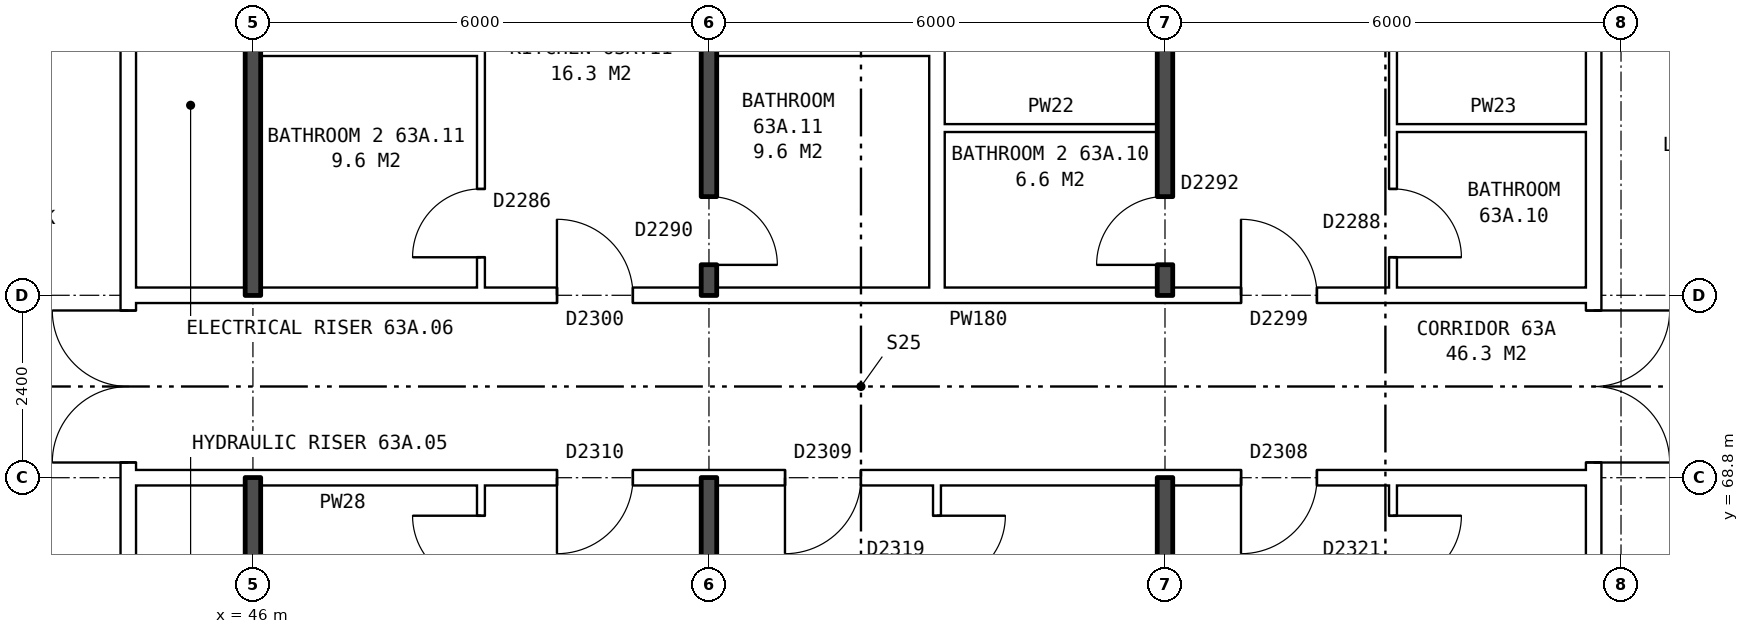
"""IFC4 building model, lengths in metres.
Left out: names, types, materials, properties, quantities, classifications, styles, units other than length and angle.
Written with IfcOpenShell. Run it as: python <this file> out.ifc"""

import sys

from ifc_helpers import new_model, si_unit, direction, frame, frame_2d, origin, place, context, subcontext, project, spatial, rectangle, extrude, element, fill, save


model = new_model("IFC4")
c1 = context("Model", 3, precision=1e-05, world=origin(), true_north=direction((0.0, 1.0)))
c2 = subcontext(c1, "Body", "Model", "MODEL_VIEW")
j1 = project(units=[si_unit("LENGTHUNIT", "METRE"), si_unit("PLANEANGLEUNIT", "RADIAN")], contexts=[c1])
p1 = place(None, origin())
s1 = spatial("IfcSite", under=j1, at=p1, CompositionType="ELEMENT")
p2 = place(p1, origin())
s2 = spatial("IfcBuilding", under=s1, at=p2, CompositionType="ELEMENT")
p3 = place(p2, frame((0.0, 0.0, 224.5)))
s3 = spatial("IfcBuildingStorey", under=s2, at=p3, CompositionType="ELEMENT", Elevation=224.5)
p4 = place(p3, frame((63.64, 63.9, 0.0), z_axis=(0.0, 0.0, 1.0), x_axis=(0.0, 1.0, 0.0)))
e1 = element("IfcWall", 1, at=p4, inside=s3, PredefinedType="PARTITIONING", context=c2, shape_type="SweptSolid", body=[
    extrude(rectangle(XDim=12.2, YDim=0.2, at=frame_2d((6.1, 0.0))), origin(), (0.0, 0.0, 1.0), 2.85),
])
p5 = place(p4, frame((5.1, 0.0, 0.0)))
e2 = element("IfcOpeningElement", 2, at=p5, cuts=e1, PredefinedType="OPENING", context=c2, shape_type="SweptSolid", body=[
    extrude(rectangle(XDim=2.0, YDim=2.1, at=frame_2d((1.0, 1.05))), frame((0.0, 0.11, 0.0), z_axis=(0.0, -1.0, 0.0), x_axis=(1.0, 0.0, 0.0)), (0.0, 0.0, 1.0), 0.22),
])
p6 = place(p3, frame((44.36, 63.9, 0.0), z_axis=(0.0, 0.0, 1.0), x_axis=(0.0, 1.0, 0.0)))
e3 = element("IfcWall", 3, at=p6, inside=s3, PredefinedType="PARTITIONING", context=c2, shape_type="SweptSolid", body=[
    extrude(rectangle(XDim=12.2, YDim=0.2, at=frame_2d((6.1, 0.0))), origin(), (0.0, 0.0, 1.0), 2.85),
])
p7 = place(p6, frame((5.1, 0.0, 0.0)))
e4 = element("IfcOpeningElement", 4, at=p7, cuts=e3, PredefinedType="OPENING", context=c2, shape_type="SweptSolid", body=[
    extrude(rectangle(XDim=2.0, YDim=2.1, at=frame_2d((1.0, 1.05))), frame((0.0, 0.11, 0.0), z_axis=(0.0, -1.0, 0.0), x_axis=(1.0, 0.0, 0.0)), (0.0, 0.0, 1.0), 0.22),
])
p8 = place(p3, frame((44.36, 68.8, 0.0), z_axis=(0.0, 0.0, 1.0), x_axis=(1.0, 0.0, 0.0)))
e5 = element("IfcWall", 5, at=p8, inside=s3, PredefinedType="PARTITIONING", context=c2, shape_type="SweptSolid", body=[
    extrude(rectangle(XDim=19.28, YDim=0.2, at=frame_2d((9.64, 0.0))), origin(), (0.0, 0.0, 1.0), 2.85),
])
p9 = place(p8, frame((14.64, 0.0, 0.0)))
e6 = element("IfcOpeningElement", 6, at=p9, cuts=e5, PredefinedType="OPENING", context=c2, shape_type="SweptSolid", body=[
    extrude(rectangle(XDim=1.0, YDim=2.1, at=frame_2d((0.5, 1.05))), frame((0.0, 0.11, 0.0), z_axis=(0.0, -1.0, 0.0), x_axis=(1.0, 0.0, 0.0)), (0.0, 0.0, 1.0), 0.22),
])
p10 = place(p8, frame((8.64, 0.0, 0.0)))
e7 = element("IfcOpeningElement", 7, at=p10, cuts=e5, PredefinedType="OPENING", context=c2, shape_type="SweptSolid", body=[
    extrude(rectangle(XDim=1.0, YDim=2.1, at=frame_2d((0.5, 1.05))), frame((0.0, 0.11, 0.0), z_axis=(0.0, -1.0, 0.0), x_axis=(1.0, 0.0, 0.0)), (0.0, 0.0, 1.0), 0.22),
])
p11 = place(p8, frame((5.64, 0.0, 0.0)))
e8 = element("IfcOpeningElement", 8, at=p11, cuts=e5, PredefinedType="OPENING", context=c2, shape_type="SweptSolid", body=[
    extrude(rectangle(XDim=1.0, YDim=2.1, at=frame_2d((0.5, 1.05))), frame((0.0, 0.11, 0.0), z_axis=(0.0, -1.0, 0.0), x_axis=(1.0, 0.0, 0.0)), (0.0, 0.0, 1.0), 0.22),
])
p12 = place(p3, frame((44.36, 71.2, 0.0), z_axis=(0.0, 0.0, 1.0), x_axis=(1.0, 0.0, 0.0)))
e9 = element("IfcWall", 9, at=p12, inside=s3, PredefinedType="PARTITIONING", context=c2, shape_type="SweptSolid", body=[
    extrude(rectangle(XDim=19.28, YDim=0.2, at=frame_2d((9.64, 0.0))), origin(), (0.0, 0.0, 1.0), 2.85),
])
p13 = place(p12, frame((14.64, 0.0, 0.0)))
e10 = element("IfcOpeningElement", 10, at=p13, cuts=e9, PredefinedType="OPENING", context=c2, shape_type="SweptSolid", body=[
    extrude(rectangle(XDim=1.0, YDim=2.1, at=frame_2d((0.5, 1.05))), frame((0.0, 0.11, 0.0), z_axis=(0.0, -1.0, 0.0), x_axis=(1.0, 0.0, 0.0)), (0.0, 0.0, 1.0), 0.22),
])
p14 = place(p12, frame((5.64, 0.0, 0.0)))
e11 = element("IfcOpeningElement", 11, at=p14, cuts=e9, PredefinedType="OPENING", context=c2, shape_type="SweptSolid", body=[
    extrude(rectangle(XDim=1.0, YDim=2.1, at=frame_2d((0.5, 1.05))), frame((0.0, 0.11, 0.0), z_axis=(0.0, -1.0, 0.0), x_axis=(1.0, 0.0, 0.0)), (0.0, 0.0, 1.0), 0.22),
])
p15 = place(p3, frame((55.1, 73.4, 0.0), z_axis=(0.0, 0.0, 1.0), x_axis=(1.0, 0.0, 0.0)))
e12 = element("IfcWall", 12, at=p15, inside=s3, PredefinedType="PARTITIONING", context=c2, shape_type="SweptSolid", body=[
    extrude(rectangle(XDim=2.8, YDim=0.1, at=frame_2d((1.4, 0.0))), origin(), (0.0, 0.0, 1.0), 2.85),
])
p16 = place(p3, frame((61.0, 73.4, 0.0), z_axis=(0.0, 0.0, 1.0), x_axis=(1.0, 0.0, 0.0)))
e13 = element("IfcWall", 13, at=p16, inside=s3, PredefinedType="PARTITIONING", context=c2, shape_type="SweptSolid", body=[
    extrude(rectangle(XDim=2.64, YDim=0.1, at=frame_2d((1.32, 0.0))), origin(), (0.0, 0.0, 1.0), 2.85),
])
p17 = place(p3, frame((46.1, 74.4, 0.0), z_axis=(0.0, 0.0, 1.0), x_axis=(1.0, 0.0, 0.0)))
e14 = element("IfcWall", 14, at=p17, inside=s3, PredefinedType="PARTITIONING", context=c2, shape_type="SweptSolid", body=[
    extrude(rectangle(XDim=2.9, YDim=0.1, at=frame_2d((1.45, 0.0))), origin(), (0.0, 0.0, 1.0), 2.85),
])
p18 = place(p3, frame((52.1, 74.4, 0.0), z_axis=(0.0, 0.0, 1.0), x_axis=(1.0, 0.0, 0.0)))
e15 = element("IfcWall", 15, at=p18, inside=s3, PredefinedType="PARTITIONING", context=c2, shape_type="SweptSolid", body=[
    extrude(rectangle(XDim=2.8, YDim=0.1, at=frame_2d((1.4, 0.0))), origin(), (0.0, 0.0, 1.0), 2.85),
])
for number, where, z_axis, x_axis in (
    (16, (46.0, 54.36, 0.0), (0.0, 0.0, 1.0), (0.0, 1.0, 0.0)),
    (17, (46.0, 71.2, 0.0), (0.0, 0.0, 1.0), (0.0, 1.0, 0.0)),
):
    element("IfcWall", number, at=place(p3, frame(where, z_axis=z_axis, x_axis=x_axis)), inside=s3, PredefinedType="SOLIDWALL", context=c2, shape_type="SweptSolid", body=[
        extrude(rectangle(XDim=14.44, YDim=0.2, at=frame_2d((7.22, 0.0))), origin(), (0.0, 0.0, 1.0), 2.85),
    ])
p19 = place(p3, frame((49.0, 54.36, 0.0), z_axis=(0.0, 0.0, 1.0), x_axis=(0.0, 1.0, 0.0)))
e18 = element("IfcWall", 18, at=p19, inside=s3, PredefinedType="PARTITIONING", context=c2, shape_type="SweptSolid", body=[
    extrude(rectangle(XDim=14.34, YDim=0.1, at=frame_2d((7.17, 0.0))), origin(), (0.0, 0.0, 1.0), 2.85),
])
p20 = place(p19, frame((7.7, 0.0, 0.0)))
e19 = element("IfcOpeningElement", 19, at=p20, cuts=e18, PredefinedType="OPENING", context=c2, shape_type="SweptSolid", body=[
    extrude(rectangle(XDim=0.9, YDim=2.1, at=frame_2d((0.45, 1.05))), frame((0.0, 0.06, 0.0), z_axis=(0.0, -1.0, 0.0), x_axis=(1.0, 0.0, 0.0)), (0.0, 0.0, 1.0), 0.12),
])
p21 = place(p19, frame((13.04, 0.0, 0.0)))
e20 = element("IfcOpeningElement", 20, at=p21, cuts=e18, PredefinedType="OPENING", context=c2, shape_type="SweptSolid", body=[
    extrude(rectangle(XDim=0.9, YDim=2.1, at=frame_2d((0.45, 1.05))), frame((0.0, 0.06, 0.0), z_axis=(0.0, -1.0, 0.0), x_axis=(1.0, 0.0, 0.0)), (0.0, 0.0, 1.0), 0.12),
])
p22 = place(p3, frame((49.0, 71.3, 0.0), z_axis=(0.0, 0.0, 1.0), x_axis=(0.0, 1.0, 0.0)))
e21 = element("IfcWall", 21, at=p22, inside=s3, PredefinedType="PARTITIONING", context=c2, shape_type="SweptSolid", body=[
    extrude(rectangle(XDim=14.34, YDim=0.1, at=frame_2d((7.17, 0.0))), origin(), (0.0, 0.0, 1.0), 2.85),
])
p23 = place(p22, frame((5.74, 0.0, 0.0)))
e22 = element("IfcOpeningElement", 22, at=p23, cuts=e21, PredefinedType="OPENING", context=c2, shape_type="SweptSolid", body=[
    extrude(rectangle(XDim=0.9, YDim=2.1, at=frame_2d((0.45, 1.05))), frame((0.0, 0.06, 0.0), z_axis=(0.0, -1.0, 0.0), x_axis=(1.0, 0.0, 0.0)), (0.0, 0.0, 1.0), 0.12),
])
p24 = place(p22, frame((0.4, 0.0, 0.0)))
e23 = element("IfcOpeningElement", 23, at=p24, cuts=e21, PredefinedType="OPENING", context=c2, shape_type="SweptSolid", body=[
    extrude(rectangle(XDim=0.9, YDim=2.1, at=frame_2d((0.45, 1.05))), frame((0.0, 0.06, 0.0), z_axis=(0.0, -1.0, 0.0), x_axis=(1.0, 0.0, 0.0)), (0.0, 0.0, 1.0), 0.12),
])
p25 = place(p3, frame((52.0, 54.36, 0.0), z_axis=(0.0, 0.0, 1.0), x_axis=(0.0, 1.0, 0.0)))
e24 = element("IfcWall", 24, at=p25, inside=s3, PredefinedType="SOLIDWALL", context=c2, shape_type="SweptSolid", body=[
    extrude(rectangle(XDim=14.44, YDim=0.2, at=frame_2d((7.22, 0.0))), origin(), (0.0, 0.0, 1.0), 2.85),
])
p26 = place(p3, frame((52.0, 71.2, 0.0), z_axis=(0.0, 0.0, 1.0), x_axis=(0.0, 1.0, 0.0)))
e25 = element("IfcWall", 25, at=p26, inside=s3, PredefinedType="SOLIDWALL", context=c2, shape_type="SweptSolid", body=[
    extrude(rectangle(XDim=14.44, YDim=0.2, at=frame_2d((7.22, 0.0))), origin(), (0.0, 0.0, 1.0), 2.85),
])
p27 = place(p26, frame((5.84, 0.0, 0.0)))
e26 = element("IfcOpeningElement", 26, at=p27, cuts=e25, PredefinedType="OPENING", context=c2, shape_type="SweptSolid", body=[
    extrude(rectangle(XDim=0.9, YDim=2.1, at=frame_2d((0.45, 1.05))), frame((0.0, 0.11, 0.0), z_axis=(0.0, -1.0, 0.0), x_axis=(1.0, 0.0, 0.0)), (0.0, 0.0, 1.0), 0.22),
])
p28 = place(p26, frame((0.4, 0.0, 0.0)))
e27 = element("IfcOpeningElement", 27, at=p28, cuts=e25, PredefinedType="OPENING", context=c2, shape_type="SweptSolid", body=[
    extrude(rectangle(XDim=0.9, YDim=2.1, at=frame_2d((0.45, 1.05))), frame((0.0, 0.11, 0.0), z_axis=(0.0, -1.0, 0.0), x_axis=(1.0, 0.0, 0.0)), (0.0, 0.0, 1.0), 0.22),
])
p29 = place(p3, frame((55.0, 54.36, 0.0), z_axis=(0.0, 0.0, 1.0), x_axis=(0.0, 1.0, 0.0)))
e28 = element("IfcWall", 28, at=p29, inside=s3, PredefinedType="PARTITIONING", context=c2, shape_type="SweptSolid", body=[
    extrude(rectangle(XDim=14.34, YDim=0.1, at=frame_2d((7.17, 0.0))), origin(), (0.0, 0.0, 1.0), 2.85),
])
p30 = place(p29, frame((4.2, 0.0, 0.0)))
e29 = element("IfcOpeningElement", 29, at=p30, cuts=e28, PredefinedType="OPENING", context=c2, shape_type="SweptSolid", body=[
    extrude(rectangle(XDim=0.9, YDim=2.1, at=frame_2d((0.45, 1.05))), frame((0.0, 0.06, 0.0), z_axis=(0.0, -1.0, 0.0), x_axis=(1.0, 0.0, 0.0)), (0.0, 0.0, 1.0), 0.12),
])
p31 = place(p29, frame((13.04, 0.0, 0.0)))
e30 = element("IfcOpeningElement", 30, at=p31, cuts=e28, PredefinedType="OPENING", context=c2, shape_type="SweptSolid", body=[
    extrude(rectangle(XDim=0.9, YDim=2.1, at=frame_2d((0.45, 1.05))), frame((0.0, 0.06, 0.0), z_axis=(0.0, -1.0, 0.0), x_axis=(1.0, 0.0, 0.0)), (0.0, 0.0, 1.0), 0.12),
])
p32 = place(p3, frame((55.0, 71.3, 0.0), z_axis=(0.0, 0.0, 1.0), x_axis=(0.0, 1.0, 0.0)))
e31 = element("IfcWall", 31, at=p32, inside=s3, PredefinedType="PARTITIONING", context=c2, shape_type="SweptSolid", body=[
    extrude(rectangle(XDim=14.34, YDim=0.2, at=frame_2d((7.17, 0.0))), origin(), (0.0, 0.0, 1.0), 2.85),
])
p33 = place(p3, frame((58.0, 54.36, 0.0), z_axis=(0.0, 0.0, 1.0), x_axis=(0.0, 1.0, 0.0)))
e32 = element("IfcWall", 32, at=p33, inside=s3, PredefinedType="SOLIDWALL", context=c2, shape_type="SweptSolid", body=[
    extrude(rectangle(XDim=14.44, YDim=0.2, at=frame_2d((7.22, 0.0))), origin(), (0.0, 0.0, 1.0), 2.85),
])
p34 = place(p3, frame((58.0, 71.2, 0.0), z_axis=(0.0, 0.0, 1.0), x_axis=(0.0, 1.0, 0.0)))
e33 = element("IfcWall", 33, at=p34, inside=s3, PredefinedType="SOLIDWALL", context=c2, shape_type="SweptSolid", body=[
    extrude(rectangle(XDim=14.44, YDim=0.2, at=frame_2d((7.22, 0.0))), origin(), (0.0, 0.0, 1.0), 2.85),
])
p35 = place(p34, frame((8.04, 0.0, 0.0)))
e34 = element("IfcOpeningElement", 34, at=p35, cuts=e33, PredefinedType="OPENING", context=c2, shape_type="SweptSolid", body=[
    extrude(rectangle(XDim=0.9, YDim=2.1, at=frame_2d((0.45, 1.05))), frame((0.0, 0.11, 0.0), z_axis=(0.0, -1.0, 0.0), x_axis=(1.0, 0.0, 0.0)), (0.0, 0.0, 1.0), 0.22),
])
p36 = place(p34, frame((0.4, 0.0, 0.0)))
e35 = element("IfcOpeningElement", 35, at=p36, cuts=e33, PredefinedType="OPENING", context=c2, shape_type="SweptSolid", body=[
    extrude(rectangle(XDim=0.9, YDim=2.1, at=frame_2d((0.45, 1.05))), frame((0.0, 0.11, 0.0), z_axis=(0.0, -1.0, 0.0), x_axis=(1.0, 0.0, 0.0)), (0.0, 0.0, 1.0), 0.22),
])
p37 = place(p3, frame((61.0, 54.36, 0.0), z_axis=(0.0, 0.0, 1.0), x_axis=(0.0, 1.0, 0.0)))
e36 = element("IfcWall", 36, at=p37, inside=s3, PredefinedType="PARTITIONING", context=c2, shape_type="SweptSolid", body=[
    extrude(rectangle(XDim=14.34, YDim=0.1, at=frame_2d((7.17, 0.0))), origin(), (0.0, 0.0, 1.0), 2.85),
])
p38 = place(p37, frame((7.7, 0.0, 0.0)))
e37 = element("IfcOpeningElement", 37, at=p38, cuts=e36, PredefinedType="OPENING", context=c2, shape_type="SweptSolid", body=[
    extrude(rectangle(XDim=0.9, YDim=2.1, at=frame_2d((0.45, 1.05))), frame((0.0, 0.06, 0.0), z_axis=(0.0, -1.0, 0.0), x_axis=(1.0, 0.0, 0.0)), (0.0, 0.0, 1.0), 0.12),
])
p39 = place(p37, frame((13.04, 0.0, 0.0)))
e38 = element("IfcOpeningElement", 38, at=p39, cuts=e36, PredefinedType="OPENING", context=c2, shape_type="SweptSolid", body=[
    extrude(rectangle(XDim=0.9, YDim=2.1, at=frame_2d((0.45, 1.05))), frame((0.0, 0.06, 0.0), z_axis=(0.0, -1.0, 0.0), x_axis=(1.0, 0.0, 0.0)), (0.0, 0.0, 1.0), 0.12),
])
p40 = place(p3, frame((61.0, 71.3, 0.0), z_axis=(0.0, 0.0, 1.0), x_axis=(0.0, 1.0, 0.0)))
e39 = element("IfcWall", 39, at=p40, inside=s3, PredefinedType="PARTITIONING", context=c2, shape_type="SweptSolid", body=[
    extrude(rectangle(XDim=14.34, YDim=0.1, at=frame_2d((7.17, 0.0))), origin(), (0.0, 0.0, 1.0), 2.85),
])
p41 = place(p40, frame((7.94, 0.0, 0.0)))
e40 = element("IfcOpeningElement", 40, at=p41, cuts=e39, PredefinedType="OPENING", context=c2, shape_type="SweptSolid", body=[
    extrude(rectangle(XDim=0.9, YDim=2.1, at=frame_2d((0.45, 1.05))), frame((0.0, 0.06, 0.0), z_axis=(0.0, -1.0, 0.0), x_axis=(1.0, 0.0, 0.0)), (0.0, 0.0, 1.0), 0.12),
])
p42 = place(p40, frame((0.4, 0.0, 0.0)))
e41 = element("IfcOpeningElement", 41, at=p42, cuts=e39, PredefinedType="OPENING", context=c2, shape_type="SweptSolid", body=[
    extrude(rectangle(XDim=0.9, YDim=2.1, at=frame_2d((0.45, 1.05))), frame((0.0, 0.06, 0.0), z_axis=(0.0, -1.0, 0.0), x_axis=(1.0, 0.0, 0.0)), (0.0, 0.0, 1.0), 0.12),
])
p43 = place(p5, frame((2.0, 0.0, 0.0), z_axis=(0.0, 0.0, 1.0), x_axis=(-1.0, 0.0, 0.0)))
e42 = element("IfcDoor", 42, at=p43, inside=s3, OperationType="DOUBLE_DOOR_SINGLE_SWING", PredefinedType="DOOR", context=c2, shape_type="SweptSolid", body=[
    extrude(rectangle(XDim=2.0, YDim=2.1, at=frame_2d((1.0, 1.05))), frame((0.0, 0.025, 0.0), z_axis=(0.0, -1.0, 0.0), x_axis=(1.0, 0.0, 0.0)), (0.0, 0.0, 1.0), 0.05),
])
fill(e2, e42)
p44 = place(p7, origin())
e43 = element("IfcDoor", 43, at=p44, inside=s3, OperationType="DOUBLE_DOOR_SINGLE_SWING", PredefinedType="DOOR", context=c2, shape_type="SweptSolid", body=[
    extrude(rectangle(XDim=2.0, YDim=2.1, at=frame_2d((1.0, 1.05))), frame((0.0, 0.025, 0.0), z_axis=(0.0, -1.0, 0.0), x_axis=(1.0, 0.0, 0.0)), (0.0, 0.0, 1.0), 0.05),
])
fill(e4, e43)
p45 = place(p9, frame((1.0, 0.0, 0.0), z_axis=(0.0, 0.0, 1.0), x_axis=(-1.0, 0.0, 0.0)))
e44 = element("IfcDoor", 44, at=p45, inside=s3, OperationType="SINGLE_SWING_RIGHT", PredefinedType="DOOR", context=c2, shape_type="SweptSolid", body=[
    extrude(rectangle(XDim=1.0, YDim=2.1, at=frame_2d((0.5, 1.05))), frame((0.0, 0.025, 0.0), z_axis=(0.0, -1.0, 0.0), x_axis=(1.0, 0.0, 0.0)), (0.0, 0.0, 1.0), 0.05),
])
fill(e6, e44)
p46 = place(p39, frame((0.9, 0.0, 0.0), z_axis=(0.0, 0.0, 1.0), x_axis=(-1.0, 0.0, 0.0)))
e45 = element("IfcDoor", 45, at=p46, inside=s3, OperationType="SINGLE_SWING_LEFT", PredefinedType="DOOR", context=c2, shape_type="SweptSolid", body=[
    extrude(rectangle(XDim=0.9, YDim=2.1, at=frame_2d((0.45, 1.05))), frame((0.0, 0.025, 0.0), z_axis=(0.0, -1.0, 0.0), x_axis=(1.0, 0.0, 0.0)), (0.0, 0.0, 1.0), 0.05),
])
fill(e38, e45)
p47 = place(p10, frame((1.0, 0.0, 0.0), z_axis=(0.0, 0.0, 1.0), x_axis=(-1.0, 0.0, 0.0)))
e46 = element("IfcDoor", 46, at=p47, inside=s3, OperationType="SINGLE_SWING_RIGHT", PredefinedType="DOOR", context=c2, shape_type="SweptSolid", body=[
    extrude(rectangle(XDim=1.0, YDim=2.1, at=frame_2d((0.5, 1.05))), frame((0.0, 0.025, 0.0), z_axis=(0.0, -1.0, 0.0), x_axis=(1.0, 0.0, 0.0)), (0.0, 0.0, 1.0), 0.05),
])
fill(e7, e46)
p48 = place(p31, frame((0.9, 0.0, 0.0), z_axis=(0.0, 0.0, 1.0), x_axis=(-1.0, 0.0, 0.0)))
e47 = element("IfcDoor", 47, at=p48, inside=s3, OperationType="SINGLE_SWING_LEFT", PredefinedType="DOOR", context=c2, shape_type="SweptSolid", body=[
    extrude(rectangle(XDim=0.9, YDim=2.1, at=frame_2d((0.45, 1.05))), frame((0.0, 0.025, 0.0), z_axis=(0.0, -1.0, 0.0), x_axis=(1.0, 0.0, 0.0)), (0.0, 0.0, 1.0), 0.05),
])
fill(e30, e47)
p49 = place(p11, frame((1.0, 0.0, 0.0), z_axis=(0.0, 0.0, 1.0), x_axis=(-1.0, 0.0, 0.0)))
e48 = element("IfcDoor", 48, at=p49, inside=s3, OperationType="SINGLE_SWING_RIGHT", PredefinedType="DOOR", context=c2, shape_type="SweptSolid", body=[
    extrude(rectangle(XDim=1.0, YDim=2.1, at=frame_2d((0.5, 1.05))), frame((0.0, 0.025, 0.0), z_axis=(0.0, -1.0, 0.0), x_axis=(1.0, 0.0, 0.0)), (0.0, 0.0, 1.0), 0.05),
])
fill(e8, e48)
p50 = place(p21, origin())
e49 = element("IfcDoor", 49, at=p50, inside=s3, OperationType="SINGLE_SWING_RIGHT", PredefinedType="DOOR", context=c2, shape_type="SweptSolid", body=[
    extrude(rectangle(XDim=0.9, YDim=2.1, at=frame_2d((0.45, 1.05))), frame((0.0, 0.025, 0.0), z_axis=(0.0, -1.0, 0.0), x_axis=(1.0, 0.0, 0.0)), (0.0, 0.0, 1.0), 0.05),
])
fill(e20, e49)
p51 = place(p13, origin())
e50 = element("IfcDoor", 50, at=p51, inside=s3, OperationType="SINGLE_SWING_LEFT", PredefinedType="DOOR", context=c2, shape_type="SweptSolid", body=[
    extrude(rectangle(XDim=1.0, YDim=2.1, at=frame_2d((0.5, 1.05))), frame((0.0, 0.025, 0.0), z_axis=(0.0, -1.0, 0.0), x_axis=(1.0, 0.0, 0.0)), (0.0, 0.0, 1.0), 0.05),
])
fill(e10, e50)
p52 = place(p42, frame((0.9, 0.0, 0.0), z_axis=(0.0, 0.0, 1.0), x_axis=(-1.0, 0.0, 0.0)))
e51 = element("IfcDoor", 51, at=p52, inside=s3, OperationType="SINGLE_SWING_RIGHT", PredefinedType="DOOR", context=c2, shape_type="SweptSolid", body=[
    extrude(rectangle(XDim=0.9, YDim=2.1, at=frame_2d((0.45, 1.05))), frame((0.0, 0.025, 0.0), z_axis=(0.0, -1.0, 0.0), x_axis=(1.0, 0.0, 0.0)), (0.0, 0.0, 1.0), 0.05),
])
fill(e41, e51)
p53 = place(p36, origin())
e52 = element("IfcDoor", 52, at=p53, inside=s3, OperationType="SINGLE_SWING_LEFT", PredefinedType="DOOR", context=c2, shape_type="SweptSolid", body=[
    extrude(rectangle(XDim=0.9, YDim=2.1, at=frame_2d((0.45, 1.05))), frame((0.0, 0.025, 0.0), z_axis=(0.0, -1.0, 0.0), x_axis=(1.0, 0.0, 0.0)), (0.0, 0.0, 1.0), 0.05),
])
fill(e35, e52)
p54 = place(p14, origin())
e53 = element("IfcDoor", 53, at=p54, inside=s3, OperationType="SINGLE_SWING_LEFT", PredefinedType="DOOR", context=c2, shape_type="SweptSolid", body=[
    extrude(rectangle(XDim=1.0, YDim=2.1, at=frame_2d((0.5, 1.05))), frame((0.0, 0.025, 0.0), z_axis=(0.0, -1.0, 0.0), x_axis=(1.0, 0.0, 0.0)), (0.0, 0.0, 1.0), 0.05),
])
fill(e11, e53)
p55 = place(p28, frame((0.9, 0.0, 0.0), z_axis=(0.0, 0.0, 1.0), x_axis=(-1.0, 0.0, 0.0)))
e54 = element("IfcDoor", 54, at=p55, inside=s3, OperationType="SINGLE_SWING_RIGHT", PredefinedType="DOOR", context=c2, shape_type="SweptSolid", body=[
    extrude(rectangle(XDim=0.9, YDim=2.1, at=frame_2d((0.45, 1.05))), frame((0.0, 0.025, 0.0), z_axis=(0.0, -1.0, 0.0), x_axis=(1.0, 0.0, 0.0)), (0.0, 0.0, 1.0), 0.05),
])
fill(e27, e54)
p56 = place(p24, origin())
e55 = element("IfcDoor", 55, at=p56, inside=s3, OperationType="SINGLE_SWING_LEFT", PredefinedType="DOOR", context=c2, shape_type="SweptSolid", body=[
    extrude(rectangle(XDim=0.9, YDim=2.1, at=frame_2d((0.45, 1.05))), frame((0.0, 0.025, 0.0), z_axis=(0.0, -1.0, 0.0), x_axis=(1.0, 0.0, 0.0)), (0.0, 0.0, 1.0), 0.05),
])
fill(e23, e55)
save(model, sys.argv[1])
